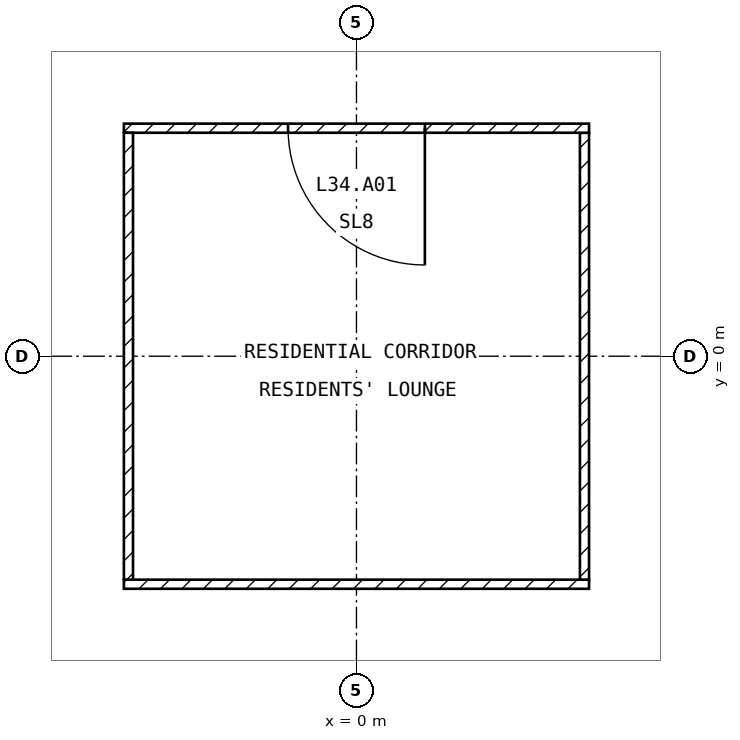
"""IFC4 building model, lengths in metres.
Left out: names, types, materials, properties, quantities, classifications, styles, units other than length and angle.
Written with IfcOpenShell. Run it as: python <this file> out.ifc"""

import sys

from ifc_helpers import new_model, si_unit, direction, frame, frame_2d, origin, place, context, subcontext, project, spatial, rectangle, extrude, element, fill, save


model = new_model("IFC4")
c1 = context("Model", 3, precision=1e-05, world=origin(), true_north=direction((0.0, 1.0)))
c2 = subcontext(c1, "Body", "Model", "MODEL_VIEW")
j1 = project(units=[si_unit("LENGTHUNIT", "METRE"), si_unit("PLANEANGLEUNIT", "RADIAN")], contexts=[c1])
p1 = place(None, origin())
s1 = spatial("IfcSite", under=j1, at=p1, CompositionType="ELEMENT")
p2 = place(p1, origin())
s2 = spatial("IfcBuilding", under=s1, at=p2, CompositionType="ELEMENT")
p3 = place(p2, frame((0.0, 0.0, 140.9)))
s3 = spatial("IfcBuildingStorey", under=s2, at=p3, CompositionType="ELEMENT", Elevation=140.9)
p4 = place(p3, frame((-3.06, -3.0, 0.0), z_axis=(0.0, 0.0, 1.0), x_axis=(1.0, 0.0, 0.0)))
e1 = element("IfcWall", 1, at=p4, inside=s3, PredefinedType="PARTITIONING", context=c2, shape_type="SweptSolid", body=[
    extrude(rectangle(XDim=6.12, YDim=0.12, at=frame_2d((3.06, 0.0))), origin(), (0.0, 0.0, 1.0), 3.25),
])
p5 = place(p3, frame((3.0, -2.94, 0.0), z_axis=(0.0, 0.0, 1.0), x_axis=(0.0, 1.0, 0.0)))
e2 = element("IfcWall", 2, at=p5, inside=s3, PredefinedType="PARTITIONING", context=c2, shape_type="SweptSolid", body=[
    extrude(rectangle(XDim=5.88, YDim=0.12, at=frame_2d((2.94, 0.0))), origin(), (0.0, 0.0, 1.0), 3.25),
])
p6 = place(p3, frame((3.06, 3.0, 0.0), z_axis=(0.0, 0.0, 1.0), x_axis=(-1.0, 0.0, 0.0)))
e3 = element("IfcWall", 3, at=p6, inside=s3, PredefinedType="PARTITIONING", context=c2, shape_type="SweptSolid", body=[
    extrude(rectangle(XDim=6.12, YDim=0.12, at=frame_2d((3.06, 0.0))), origin(), (0.0, 0.0, 1.0), 3.25),
])
p7 = place(p6, frame((2.16, 0.0, 0.0)))
e4 = element("IfcOpeningElement", 4, at=p7, cuts=e3, PredefinedType="OPENING", context=c2, shape_type="SweptSolid", body=[
    extrude(rectangle(XDim=1.8, YDim=2.1, at=frame_2d((0.9, 1.05))), frame((0.0, 0.07, 0.0), z_axis=(0.0, -1.0, 0.0), x_axis=(1.0, 0.0, 0.0)), (0.0, 0.0, 1.0), 0.14),
])
p8 = place(p3, frame((-3.0, 2.94, 0.0), z_axis=(0.0, 0.0, 1.0), x_axis=(0.0, -1.0, 0.0)))
e5 = element("IfcWall", 5, at=p8, inside=s3, PredefinedType="PARTITIONING", context=c2, shape_type="SweptSolid", body=[
    extrude(rectangle(XDim=5.88, YDim=0.12, at=frame_2d((2.94, 0.0))), origin(), (0.0, 0.0, 1.0), 3.25),
])
p9 = place(p7, origin())
e6 = element("IfcDoor", 6, at=p9, inside=s3, OperationType="SINGLE_SWING_LEFT", PredefinedType="DOOR", context=c2, shape_type="SweptSolid", body=[
    extrude(rectangle(XDim=1.8, YDim=2.1, at=frame_2d((0.9, 1.05))), frame((0.0, 0.025, 0.0), z_axis=(0.0, -1.0, 0.0), x_axis=(1.0, 0.0, 0.0)), (0.0, 0.0, 1.0), 0.05),
])
fill(e4, e6)
save(model, sys.argv[1])
